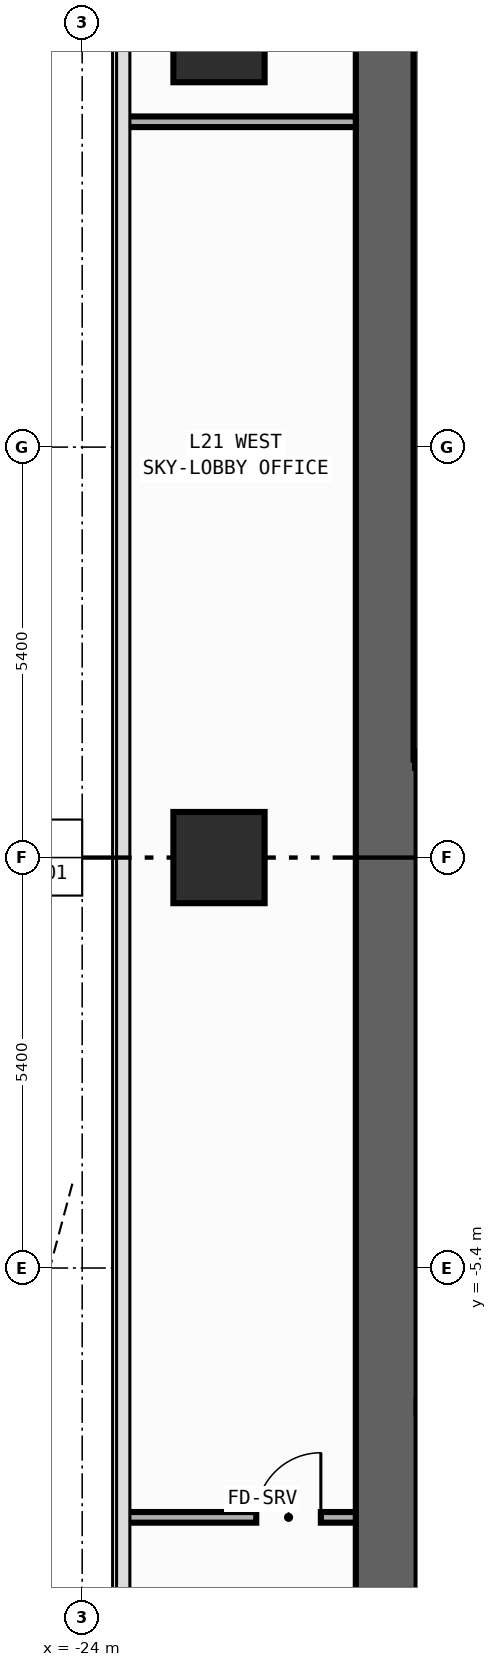
"""IFC4 building model, lengths in metres.
Left out: names, types, materials, properties, quantities, classifications, styles, units other than length and angle.
Written with IfcOpenShell. Run it as: python <this file> out.ifc"""

import sys

from ifc_helpers import new_model, si_unit, direction, frame, frame_2d, origin, origin_2d, place, context, subcontext, project, spatial, rectangle, extrude, element, fill, save


model = new_model("IFC4")
c1 = context("Model", 3, precision=1e-05, world=origin(), true_north=direction((0.0, 1.0)))
c2 = subcontext(c1, "Body", "Model", "MODEL_VIEW")
j1 = project(units=[si_unit("LENGTHUNIT", "METRE"), si_unit("PLANEANGLEUNIT", "RADIAN")], contexts=[c1])
p1 = place(None, origin())
s1 = spatial("IfcSite", under=j1, at=p1, CompositionType="ELEMENT")
p2 = place(p1, origin())
s2 = spatial("IfcBuilding", under=s1, at=p2, CompositionType="ELEMENT")
p3 = place(p2, frame((0.0, 0.0, 93.2)))
s3 = spatial("IfcBuildingStorey", under=s2, at=p3, CompositionType="ELEMENT", Elevation=93.2)
p4 = place(p3, frame((-20.0, -13.5, 0.0), z_axis=(0.0, 0.0, 1.0), x_axis=(0.0, 1.0, 0.0)))
e1 = element("IfcWall", 1, at=p4, inside=s3, PredefinedType="SHEAR", context=c2, shape_type="SweptSolid", body=[
    extrude(rectangle(XDim=27.0, YDim=0.8, at=frame_2d((13.5, 0.0))), origin(), (0.0, 0.0, 1.0), 3.94),
])
p5 = place(p3, frame((-19.53, 1.29, 0.0), z_axis=(0.0, 0.0, 1.0), x_axis=(0.0, 1.0, 0.0)))
e2 = element("IfcWall", 2, at=p5, inside=s3, PredefinedType="SHEAR", context=c2, shape_type="SweptSolid", body=[
    extrude(rectangle(XDim=11.3, YDim=0.22, at=frame_2d((5.65, 0.0))), origin(), (0.0, 0.0, 1.0), 3.94),
])
p6 = place(p3, frame((-19.62, 1.29, 0.0), z_axis=(0.0, 0.0, 1.0), x_axis=(1.0, 0.0, 0.0)))
e3 = element("IfcWall", 3, at=p6, inside=s3, PredefinedType="SHEAR", context=c2, shape_type="SweptSolid", body=[
    extrude(rectangle(XDim=3.915, YDim=0.22, at=frame_2d((1.958, 0.0))), origin(), (0.0, 0.0, 1.0), 3.94),
])
p7 = place(p6, frame((1.08, 0.0, 0.0)))
e4 = element("IfcOpeningElement", 4, at=p7, cuts=e3, PredefinedType="OPENING", context=c2, shape_type="SweptSolid", body=[
    extrude(rectangle(XDim=1.1, YDim=2.2, at=frame_2d((0.55, 1.1))), frame((0.0, 0.12, 0.0), z_axis=(0.0, -1.0, 0.0), x_axis=(1.0, 0.0, 0.0)), (0.0, 0.0, 1.0), 0.24),
])
for number, where, z_axis, x_axis in (
    (5, (-22.2, 0.0, 0.0), (0.0, 0.0, 1.0), (1.0, 0.0, 0.0)),
    (6, (-22.2, 10.8, 0.0), (0.0, 0.0, 1.0), (1.0, 0.0, 0.0)),
):
    element("IfcColumn", number, at=place(p3, frame(where, z_axis=z_axis, x_axis=x_axis)), inside=s3, PredefinedType="COLUMN", context=c2, shape_type="SweptSolid", body=[
        extrude(rectangle(XDim=1.2, YDim=1.2, at=origin_2d()), origin(), (0.0, 0.0, 1.0), 4.2),
    ])
p8 = place(p3, frame((-23.455, 9.68, 0.0), z_axis=(0.0, 0.0, 1.0), x_axis=(1.0, 0.0, 0.0)))
e7 = element("IfcWall", 7, at=p8, inside=s3, PredefinedType="PARTITIONING", context=c2, shape_type="SweptSolid", body=[
    extrude(rectangle(XDim=3.055, YDim=0.14, at=frame_2d((1.528, 0.0))), origin(), (0.0, 0.0, 1.0), 3.94),
])
p9 = place(p3, frame((-23.455, -8.68, 0.0), z_axis=(0.0, 0.0, 1.0), x_axis=(1.0, 0.0, 0.0)))
e8 = element("IfcWall", 8, at=p9, inside=s3, PredefinedType="PARTITIONING", context=c2, shape_type="SweptSolid", body=[
    extrude(rectangle(XDim=3.055, YDim=0.14, at=frame_2d((1.528, 0.0))), origin(), (0.0, 0.0, 1.0), 3.94),
])
p10 = place(p9, frame((1.745, 0.0, 0.0)))
e9 = element("IfcOpeningElement", 9, at=p10, cuts=e8, PredefinedType="OPENING", context=c2, shape_type="SweptSolid", body=[
    extrude(rectangle(XDim=0.85, YDim=2.1, at=frame_2d((0.425, 1.05))), frame((0.0, 0.08, 0.0), z_axis=(0.0, -1.0, 0.0), x_axis=(1.0, 0.0, 0.0)), (0.0, 0.0, 1.0), 0.16),
])
p11 = place(p10, origin())
e10 = element("IfcDoor", 10, at=p11, inside=s3, OperationType="SINGLE_SWING_RIGHT", PredefinedType="DOOR", context=c2, shape_type="SweptSolid", body=[
    extrude(rectangle(XDim=0.85, YDim=2.1, at=frame_2d((0.425, 1.05))), frame((0.0, 0.025, 0.0), z_axis=(0.0, -1.0, 0.0), x_axis=(1.0, 0.0, 0.0)), (0.0, 0.0, 1.0), 0.05),
])
fill(e9, e10)
save(model, sys.argv[1])
